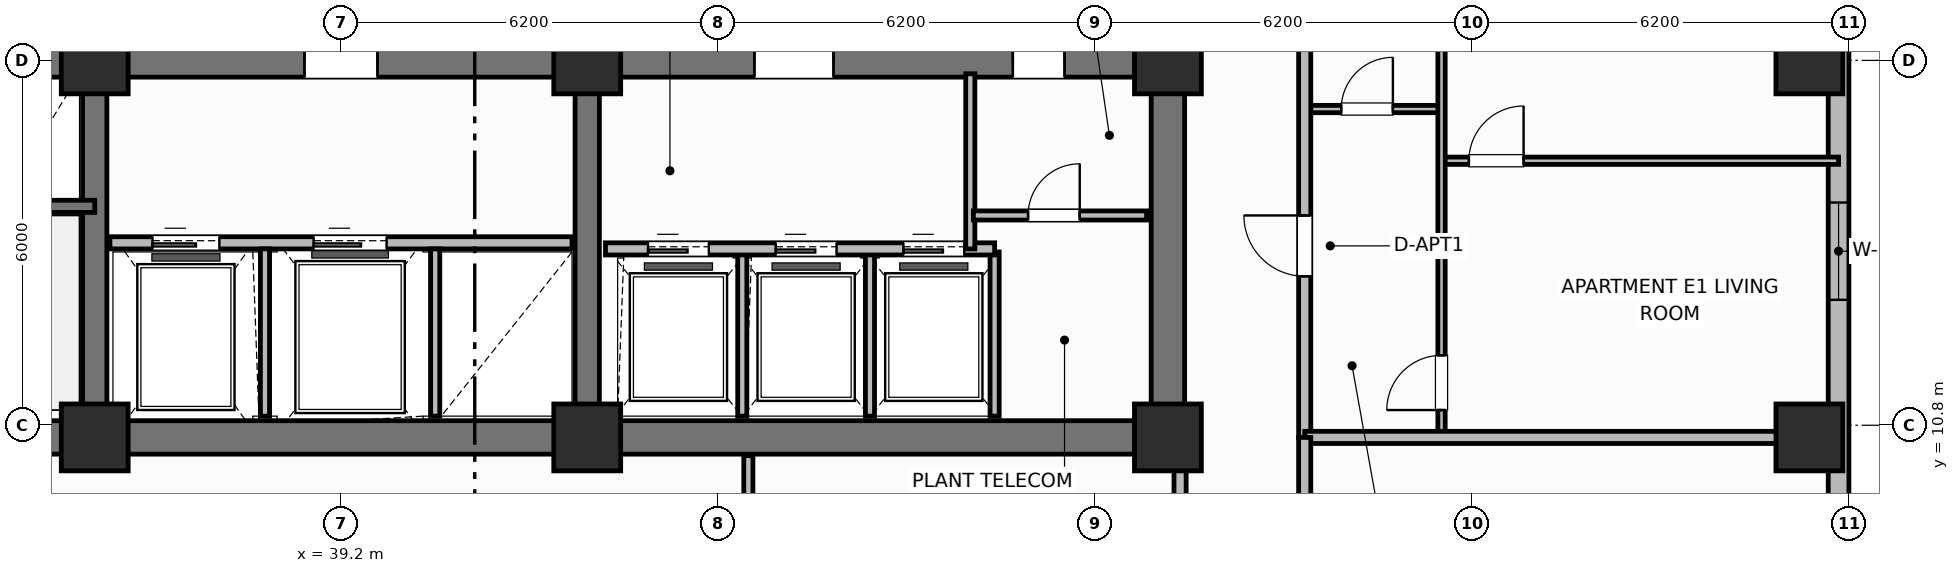
"""IFC4 building model, lengths in metres.
Left out: names, types, materials, properties, quantities, classifications, styles, units other than length and angle.
Written with IfcOpenShell. Run it as: python <this file> out.ifc"""

import sys

from ifc_helpers import new_model, si_unit, direction, frame, frame_2d, origin, origin_2d, place, context, subcontext, project, spatial, rectangle, extrude, element, fill, save


model = new_model("IFC4")
c1 = context("Model", 3, precision=1e-05, world=origin(), true_north=direction((0.0, 1.0)))
c2 = subcontext(c1, "Body", "Model", "MODEL_VIEW")
j1 = project(units=[si_unit("LENGTHUNIT", "METRE"), si_unit("PLANEANGLEUNIT", "RADIAN")], contexts=[c1])
p1 = place(None, origin())
s1 = spatial("IfcSite", under=j1, at=p1, CompositionType="ELEMENT")
p2 = place(p1, origin())
s2 = spatial("IfcBuilding", under=s1, at=p2, CompositionType="ELEMENT")
p3 = place(p2, frame((0.0, 0.0, 84.1)))
s3 = spatial("IfcBuildingStorey", under=s2, at=p3, CompositionType="ELEMENT", Elevation=84.1)
p4 = place(p3, frame((52.8, 10.6, 0.0), z_axis=(0.0, 0.0, 1.0), x_axis=(-1.0, 0.0, 0.0)))
e1 = element("IfcWall", 1, at=p4, inside=s3, PredefinedType="SHEAR", context=c2, shape_type="SweptSolid", body=[
    extrude(rectangle(XDim=27.2, YDim=0.55, at=frame_2d((13.6, 0.0))), origin(), (0.0, 0.0, 1.0), 4.2),
])
p5 = place(p3, frame((52.8, 10.875, 0.0), z_axis=(0.0, 0.0, 1.0), x_axis=(0.0, 1.0, 0.0)))
e2 = element("IfcWall", 2, at=p5, inside=s3, PredefinedType="SHEAR", context=c2, shape_type="SweptSolid", body=[
    extrude(rectangle(XDim=5.65, YDim=0.55, at=frame_2d((2.825, 0.0))), origin(), (0.0, 0.0, 1.0), 4.2),
])
p6 = place(p3, frame((25.6, 16.8, 0.0), z_axis=(0.0, 0.0, 1.0), x_axis=(1.0, 0.0, 0.0)))
e3 = element("IfcWall", 3, at=p6, inside=s3, PredefinedType="SHEAR", context=c2, shape_type="SweptSolid", body=[
    extrude(rectangle(XDim=27.2, YDim=0.55, at=frame_2d((13.6, 0.0))), origin(), (0.0, 0.0, 1.0), 4.2),
])
p7 = place(p6, frame((1.8, 0.0, 0.0)))
e4 = element("IfcOpeningElement", 4, at=p7, cuts=e3, PredefinedType="OPENING", context=c2, shape_type="SweptSolid", body=[
    extrude(rectangle(XDim=1.1, YDim=2.15, at=frame_2d((0.55, 1.075))), frame((0.0, 0.285, 0.0), z_axis=(0.0, -1.0, 0.0), x_axis=(1.0, 0.0, 0.0)), (0.0, 0.0, 1.0), 0.57),
])
p8 = place(p6, frame((5.6, 0.0, 0.0)))
e5 = element("IfcOpeningElement", 5, at=p8, cuts=e3, PredefinedType="OPENING", context=c2, shape_type="SweptSolid", body=[
    extrude(rectangle(XDim=0.85, YDim=2.1, at=frame_2d((0.425, 1.05))), frame((0.0, 0.285, 0.0), z_axis=(0.0, -1.0, 0.0), x_axis=(1.0, 0.0, 0.0)), (0.0, 0.0, 1.0), 0.57),
])
p9 = place(p6, frame((13.0, 0.0, 0.0)))
e6 = element("IfcOpeningElement", 6, at=p9, cuts=e3, PredefinedType="OPENING", context=c2, shape_type="SweptSolid", body=[
    extrude(rectangle(XDim=1.2, YDim=2.15, at=frame_2d((0.6, 1.075))), frame((0.0, 0.285, 0.0), z_axis=(0.0, -1.0, 0.0), x_axis=(1.0, 0.0, 0.0)), (0.0, 0.0, 1.0), 0.57),
])
p10 = place(p6, frame((20.4, 0.0, 0.0)))
e7 = element("IfcOpeningElement", 7, at=p10, cuts=e3, PredefinedType="OPENING", context=c2, shape_type="SweptSolid", body=[
    extrude(rectangle(XDim=1.3, YDim=2.2, at=frame_2d((0.65, 1.1))), frame((0.0, 0.285, 0.0), z_axis=(0.0, -1.0, 0.0), x_axis=(1.0, 0.0, 0.0)), (0.0, 0.0, 1.0), 0.57),
])
p11 = place(p6, frame((24.65, 0.0, 0.0)))
e8 = element("IfcOpeningElement", 8, at=p11, cuts=e3, PredefinedType="OPENING", context=c2, shape_type="SweptSolid", body=[
    extrude(rectangle(XDim=0.85, YDim=2.1, at=frame_2d((0.425, 1.05))), frame((0.0, 0.285, 0.0), z_axis=(0.0, -1.0, 0.0), x_axis=(1.0, 0.0, 0.0)), (0.0, 0.0, 1.0), 0.57),
])
for number, where, z_axis, x_axis in (
    (9, (35.15, 10.875, 0.0), (0.0, 0.0, 1.0), (0.0, 1.0, 0.0)),
    (10, (43.25, 10.875, 0.0), (0.0, 0.0, 1.0), (0.0, 1.0, 0.0)),
):
    element("IfcWall", number, at=place(p3, frame(where, z_axis=z_axis, x_axis=x_axis)), inside=s3, PredefinedType="SHEAR", context=c2, shape_type="SweptSolid", body=[
        extrude(rectangle(XDim=5.65, YDim=0.4, at=frame_2d((2.825, 0.0))), origin(), (0.0, 0.0, 1.0), 4.2),
    ])
for number, where, z_axis, x_axis in (
    (11, (35.15, 10.6, 0.0), (0.0, 0.0, 1.0), (1.0, 0.0, 0.0)),
    (12, (35.15, 16.8, 0.0), (0.0, 0.0, 1.0), (1.0, 0.0, 0.0)),
    (13, (43.25, 10.6, 0.0), (0.0, 0.0, 1.0), (1.0, 0.0, 0.0)),
    (14, (43.25, 16.8, 0.0), (0.0, 0.0, 1.0), (1.0, 0.0, 0.0)),
    (15, (52.8, 10.6, 0.0), (0.0, 0.0, 1.0), (1.0, 0.0, 0.0)),
    (16, (52.8, 16.8, 0.0), (0.0, 0.0, 1.0), (1.0, 0.0, 0.0)),
    (17, (63.35, 10.6, 0.0), (0.0, 0.0, 1.0), (1.0, 0.0, 0.0)),
    (18, (63.35, 16.8, 0.0), (0.0, 0.0, 1.0), (1.0, 0.0, 0.0)),
):
    element("IfcColumn", number, at=place(p3, frame(where, z_axis=z_axis, x_axis=x_axis)), inside=s3, PredefinedType="COLUMN", context=c2, shape_type="SweptSolid", body=[
        extrude(rectangle(XDim=1.1, YDim=1.1, at=origin_2d()), origin(), (0.0, 0.0, 1.0), 4.2),
    ])
p12 = place(p3, frame((63.83, 9.0, 0.0), z_axis=(0.0, 0.0, 1.0), x_axis=(0.0, 1.0, 0.0)))
e19 = element("IfcWall", 19, at=p12, inside=s3, PredefinedType="SOLIDWALL", context=c2, shape_type="SweptSolid", body=[
    extrude(rectangle(XDim=14.8, YDim=0.34, at=frame_2d((7.4, 0.0))), origin(), (0.0, 0.0, 1.0), 3.2),
])
p13 = place(p12, frame((3.863, 0.0, 0.85)))
e20 = element("IfcOpeningElement", 20, at=p13, cuts=e19, PredefinedType="OPENING", context=c2, shape_type="SweptSolid", body=[
    extrude(rectangle(XDim=1.6, YDim=1.9, at=frame_2d((0.8, 0.95))), frame((0.0, 0.18, 0.0), z_axis=(0.0, -1.0, 0.0), x_axis=(1.0, 0.0, 0.0)), (0.0, 0.0, 1.0), 0.36),
])
p14 = place(p12, frame((8.44, 0.0, 0.85)))
e21 = element("IfcOpeningElement", 21, at=p14, cuts=e19, PredefinedType="OPENING", context=c2, shape_type="SweptSolid", body=[
    extrude(rectangle(XDim=1.4, YDim=1.85, at=frame_2d((0.7, 0.925))), frame((0.0, 0.18, 0.0), z_axis=(0.0, -1.0, 0.0), x_axis=(1.0, 0.0, 0.0)), (0.0, 0.0, 1.0), 0.36),
])
p15 = place(p12, frame((11.663, 0.0, 0.85)))
e22 = element("IfcOpeningElement", 22, at=p15, cuts=e19, PredefinedType="OPENING", context=c2, shape_type="SweptSolid", body=[
    extrude(rectangle(XDim=1.6, YDim=1.9, at=frame_2d((0.8, 0.95))), frame((0.0, 0.18, 0.0), z_axis=(0.0, -1.0, 0.0), x_axis=(1.0, 0.0, 0.0)), (0.0, 0.0, 1.0), 0.36),
])
p16 = place(p3, frame((25.6, 14.4, 0.0), z_axis=(0.0, 0.0, 1.0), x_axis=(1.0, 0.0, 0.0)))
e23 = element("IfcWall", 23, at=p16, inside=s3, PredefinedType="SHEAR", context=c2, shape_type="SweptSolid", body=[
    extrude(rectangle(XDim=9.55, YDim=0.2, at=frame_2d((4.775, 0.0))), origin(), (0.0, 0.0, 1.0), 4.2),
])
p17 = place(p16, frame((1.05, 0.0, 0.0)))
e24 = element("IfcOpeningElement", 24, at=p17, cuts=e23, PredefinedType="OPENING", context=c2, shape_type="SweptSolid", body=[
    extrude(rectangle(XDim=1.1, YDim=2.15, at=frame_2d((0.55, 1.075))), frame((0.0, 0.11, 0.0), z_axis=(0.0, -1.0, 0.0), x_axis=(1.0, 0.0, 0.0)), (0.0, 0.0, 1.0), 0.22),
])
p18 = place(p3, frame((35.4, 13.8, 0.0), z_axis=(0.0, 0.0, 1.0), x_axis=(1.0, 0.0, 0.0)))
e25 = element("IfcWall", 25, at=p18, inside=s3, PredefinedType="PARTITIONING", context=c2, shape_type="SweptSolid", body=[
    extrude(rectangle(XDim=7.6, YDim=0.2, at=frame_2d((3.8, 0.0))), origin(), (0.0, 0.0, 1.0), 2.8),
])
p19 = place(p18, frame((0.7, 0.0, 0.0)))
e26 = element("IfcOpeningElement", 26, at=p19, cuts=e25, PredefinedType="OPENING", context=c2, shape_type="SweptSolid", body=[
    extrude(rectangle(XDim=1.1, YDim=2.15, at=frame_2d((0.55, 1.075))), frame((0.0, 0.11, 0.0), z_axis=(0.0, -1.0, 0.0), x_axis=(1.0, 0.0, 0.0)), (0.0, 0.0, 1.0), 0.22),
])
p20 = place(p18, frame((3.35, 0.0, 0.0)))
e27 = element("IfcOpeningElement", 27, at=p20, cuts=e25, PredefinedType="OPENING", context=c2, shape_type="SweptSolid", body=[
    extrude(rectangle(XDim=1.2, YDim=2.15, at=frame_2d((0.6, 1.075))), frame((0.0, 0.11, 0.0), z_axis=(0.0, -1.0, 0.0), x_axis=(1.0, 0.0, 0.0)), (0.0, 0.0, 1.0), 0.22),
])
for number, where, z_axis, x_axis in (
    (28, (37.95, 10.95, 0.0), (0.0, 0.0, 1.0), (0.0, 1.0, 0.0)),
    (29, (40.75, 10.95, 0.0), (0.0, 0.0, 1.0), (0.0, 1.0, 0.0)),
):
    element("IfcWall", number, at=place(p3, frame(where, z_axis=z_axis, x_axis=x_axis)), inside=s3, PredefinedType="PARTITIONING", context=c2, shape_type="SweptSolid", body=[
        extrude(rectangle(XDim=2.75, YDim=0.15, at=frame_2d((1.375, 0.0))), origin(), (0.0, 0.0, 1.0), 3.03),
    ])
for number, where, z_axis, x_axis in (
    (30, (45.8, 10.95, 0.0), (0.0, 0.0, 1.0), (0.0, 1.0, 0.0)),
    (31, (47.9, 10.95, 0.0), (0.0, 0.0, 1.0), (0.0, 1.0, 0.0)),
    (32, (49.95, 10.95, 0.0), (0.0, 0.0, 1.0), (0.0, 1.0, 0.0)),
):
    element("IfcWall", number, at=place(p3, frame(where, z_axis=z_axis, x_axis=x_axis)), inside=s3, PredefinedType="PARTITIONING", context=c2, shape_type="SweptSolid", body=[
        extrude(rectangle(XDim=2.7, YDim=0.15, at=frame_2d((1.35, 0.0))), origin(), (0.0, 0.0, 1.0), 3.03),
    ])
p21 = place(p3, frame((43.55, 13.7, 0.0), z_axis=(0.0, 0.0, 1.0), x_axis=(1.0, 0.0, 0.0)))
e33 = element("IfcWall", 33, at=p21, inside=s3, PredefinedType="PARTITIONING", context=c2, shape_type="SweptSolid", body=[
    extrude(rectangle(XDim=6.4, YDim=0.2, at=frame_2d((3.2, 0.0))), origin(), (0.0, 0.0, 1.0), 3.03),
])
p22 = place(p21, frame((0.7, 0.0, 0.0)))
e34 = element("IfcOpeningElement", 34, at=p22, cuts=e33, PredefinedType="OPENING", context=c2, shape_type="SweptSolid", body=[
    extrude(rectangle(XDim=1.0, YDim=2.15, at=frame_2d((0.5, 1.075))), frame((0.0, 0.11, 0.0), z_axis=(0.0, -1.0, 0.0), x_axis=(1.0, 0.0, 0.0)), (0.0, 0.0, 1.0), 0.22),
])
p23 = place(p21, frame((2.8, 0.0, 0.0)))
e35 = element("IfcOpeningElement", 35, at=p23, cuts=e33, PredefinedType="OPENING", context=c2, shape_type="SweptSolid", body=[
    extrude(rectangle(XDim=1.0, YDim=2.15, at=frame_2d((0.5, 1.075))), frame((0.0, 0.11, 0.0), z_axis=(0.0, -1.0, 0.0), x_axis=(1.0, 0.0, 0.0)), (0.0, 0.0, 1.0), 0.22),
])
p24 = place(p21, frame((4.9, 0.0, 0.0)))
e36 = element("IfcOpeningElement", 36, at=p24, cuts=e33, PredefinedType="OPENING", context=c2, shape_type="SweptSolid", body=[
    extrude(rectangle(XDim=1.0, YDim=2.15, at=frame_2d((0.5, 1.075))), frame((0.0, 0.11, 0.0), z_axis=(0.0, -1.0, 0.0), x_axis=(1.0, 0.0, 0.0)), (0.0, 0.0, 1.0), 0.22),
])
p25 = place(p3, frame((49.55, 13.7, 0.0), z_axis=(0.0, 0.0, 1.0), x_axis=(0.0, 1.0, 0.0)))
e37 = element("IfcWall", 37, at=p25, inside=s3, PredefinedType="PARTITIONING", context=c2, shape_type="SweptSolid", body=[
    extrude(rectangle(XDim=2.88, YDim=0.15, at=frame_2d((1.44, 0.0))), origin(), (0.0, 0.0, 1.0), 3.03),
])
p26 = place(p3, frame((49.6, 14.25, 0.0), z_axis=(0.0, 0.0, 1.0), x_axis=(1.0, 0.0, 0.0)))
e38 = element("IfcWall", 38, at=p26, inside=s3, PredefinedType="PARTITIONING", context=c2, shape_type="SweptSolid", body=[
    extrude(rectangle(XDim=2.85, YDim=0.15, at=frame_2d((1.425, 0.0))), origin(), (0.0, 0.0, 1.0), 3.03),
])
p27 = place(p26, frame((0.9, 0.0, 0.0)))
e39 = element("IfcOpeningElement", 39, at=p27, cuts=e38, PredefinedType="OPENING", context=c2, shape_type="SweptSolid", body=[
    extrude(rectangle(XDim=0.85, YDim=2.1, at=frame_2d((0.425, 1.05))), frame((0.0, 0.085, 0.0), z_axis=(0.0, -1.0, 0.0), x_axis=(1.0, 0.0, 0.0)), (0.0, 0.0, 1.0), 0.17),
])
p28 = place(p3, frame((55.05, 16.0, 0.0), z_axis=(0.0, 0.0, 1.0), x_axis=(1.0, 0.0, 0.0)))
e40 = element("IfcWall", 40, at=p28, inside=s3, PredefinedType="PARTITIONING", context=c2, shape_type="SweptSolid", body=[
    extrude(rectangle(XDim=2.25, YDim=0.12, at=frame_2d((1.125, 0.0))), origin(), (0.0, 0.0, 1.0), 3.03),
])
p29 = place(p28, frame((0.6, 0.0, 0.0)))
e41 = element("IfcOpeningElement", 41, at=p29, cuts=e40, PredefinedType="OPENING", context=c2, shape_type="SweptSolid", body=[
    extrude(rectangle(XDim=0.85, YDim=2.1, at=frame_2d((0.425, 1.05))), frame((0.0, 0.07, 0.0), z_axis=(0.0, -1.0, 0.0), x_axis=(1.0, 0.0, 0.0)), (0.0, 0.0, 1.0), 0.14),
])
p30 = place(p3, frame((57.3, 15.15, 0.0), z_axis=(0.0, 0.0, 1.0), x_axis=(1.0, 0.0, 0.0)))
e42 = element("IfcWall", 42, at=p30, inside=s3, PredefinedType="PARTITIONING", context=c2, shape_type="SweptSolid", body=[
    extrude(rectangle(XDim=6.53, YDim=0.12, at=frame_2d((3.265, 0.0))), origin(), (0.0, 0.0, 1.0), 3.03),
])
p31 = place(p30, frame((0.45, 0.0, 0.0)))
e43 = element("IfcOpeningElement", 43, at=p31, cuts=e42, PredefinedType="OPENING", context=c2, shape_type="SweptSolid", body=[
    extrude(rectangle(XDim=0.9, YDim=2.1, at=frame_2d((0.45, 1.05))), frame((0.0, 0.07, 0.0), z_axis=(0.0, -1.0, 0.0), x_axis=(1.0, 0.0, 0.0)), (0.0, 0.0, 1.0), 0.14),
])
p32 = place(p3, frame((57.3, 10.64, 0.0), z_axis=(0.0, 0.0, 1.0), x_axis=(0.0, 1.0, 0.0)))
e44 = element("IfcWall", 44, at=p32, inside=s3, PredefinedType="PARTITIONING", context=c2, shape_type="SweptSolid", body=[
    extrude(rectangle(XDim=19.12, YDim=0.12, at=frame_2d((9.56, 0.0))), origin(), (0.0, 0.0, 1.0), 3.03),
])
p33 = place(p32, frame((0.41, 0.0, 0.0)))
e45 = element("IfcOpeningElement", 45, at=p33, cuts=e44, PredefinedType="OPENING", context=c2, shape_type="SweptSolid", body=[
    extrude(rectangle(XDim=0.9, YDim=2.1, at=frame_2d((0.45, 1.05))), frame((0.0, 0.07, 0.0), z_axis=(0.0, -1.0, 0.0), x_axis=(1.0, 0.0, 0.0)), (0.0, 0.0, 1.0), 0.14),
])
p34 = place(p32, frame((12.105, 0.0, 0.0)))
e46 = element("IfcOpeningElement", 46, at=p34, cuts=e44, PredefinedType="OPENING", context=c2, shape_type="SweptSolid", body=[
    extrude(rectangle(XDim=0.82, YDim=2.08, at=frame_2d((0.41, 1.04))), frame((0.0, 0.07, 0.0), z_axis=(0.0, -1.0, 0.0), x_axis=(1.0, 0.0, 0.0)), (0.0, 0.0, 1.0), 0.14),
])
p35 = place(p3, frame((55.05, 10.6, 0.0), z_axis=(0.0, 0.0, 1.0), x_axis=(0.0, 1.0, 0.0)))
e47 = element("IfcWall", 47, at=p35, inside=s3, PredefinedType="PARTITIONING", context=c2, shape_type="SweptSolid", body=[
    extrude(rectangle(XDim=35.2, YDim=0.2, at=frame_2d((17.6, 0.0))), origin(), (0.0, 0.0, 1.0), 3.03),
])
p36 = place(p35, frame((2.65, 0.0, 0.0)))
e48 = element("IfcOpeningElement", 48, at=p36, cuts=e47, PredefinedType="OPENING", context=c2, shape_type="SweptSolid", body=[
    extrude(rectangle(XDim=1.0, YDim=2.15, at=frame_2d((0.5, 1.075))), frame((0.0, 0.11, 0.0), z_axis=(0.0, -1.0, 0.0), x_axis=(1.0, 0.0, 0.0)), (0.0, 0.0, 1.0), 0.22),
])
p37 = place(p35, frame((22.75, 0.0, 0.0)))
e49 = element("IfcOpeningElement", 49, at=p37, cuts=e47, PredefinedType="OPENING", context=c2, shape_type="SweptSolid", body=[
    extrude(rectangle(XDim=1.0, YDim=2.15, at=frame_2d((0.5, 1.075))), frame((0.0, 0.11, 0.0), z_axis=(0.0, -1.0, 0.0), x_axis=(1.0, 0.0, 0.0)), (0.0, 0.0, 1.0), 0.22),
])
p38 = place(p3, frame((55.05, 10.6, 0.0), z_axis=(0.0, 0.0, 1.0), x_axis=(1.0, 0.0, 0.0)))
e50 = element("IfcWall", 50, at=p38, inside=s3, PredefinedType="PARTITIONING", context=c2, shape_type="SweptSolid", body=[
    extrude(rectangle(XDim=8.36, YDim=0.2, at=frame_2d((4.18, 0.0))), origin(), (0.0, 0.0, 1.0), 3.03),
])
p39 = place(p3, frame((55.05, 4.97, 0.0), z_axis=(0.0, 0.0, 1.0), x_axis=(0.0, 1.0, 0.0)))
e51 = element("IfcWall", 51, at=p39, inside=s3, PredefinedType="PARTITIONING", context=c2, shape_type="SweptSolid", body=[
    extrude(rectangle(XDim=5.63, YDim=0.2, at=frame_2d((2.815, 0.0))), origin(), (0.0, 0.0, 1.0), 3.03),
])
p40 = place(p3, frame((45.9, 4.97, 0.0), z_axis=(0.0, 0.0, 1.0), x_axis=(0.0, 1.0, 0.0)))
e52 = element("IfcWall", 52, at=p40, inside=s3, PredefinedType="PARTITIONING", context=c2, shape_type="SweptSolid", body=[
    extrude(rectangle(XDim=5.33, YDim=0.15, at=frame_2d((2.665, 0.0))), origin(), (0.0, 0.0, 1.0), 3.03),
])
p41 = place(p3, frame((53.0, 5.52, 0.0), z_axis=(0.0, 0.0, 1.0), x_axis=(0.0, 1.0, 0.0)))
e53 = element("IfcWall", 53, at=p41, inside=s3, PredefinedType="PARTITIONING", context=c2, shape_type="SweptSolid", body=[
    extrude(rectangle(XDim=4.78, YDim=0.2, at=frame_2d((2.39, 0.0))), origin(), (0.0, 0.0, 1.0), 3.03),
])
p42 = place(p41, frame((1.3, 0.0, 0.0)))
e54 = element("IfcOpeningElement", 54, at=p42, cuts=e53, PredefinedType="OPENING", context=c2, shape_type="SweptSolid", body=[
    extrude(rectangle(XDim=0.9, YDim=2.1, at=frame_2d((0.45, 1.05))), frame((0.0, 0.11, 0.0), z_axis=(0.0, -1.0, 0.0), x_axis=(1.0, 0.0, 0.0)), (0.0, 0.0, 1.0), 0.22),
])
p43 = place(p13, origin())
e55 = element("IfcWindow", 55, at=p43, inside=s3, PartitioningType="SINGLE_PANEL", PredefinedType="WINDOW", context=c2, shape_type="SweptSolid", body=[
    extrude(rectangle(XDim=1.6, YDim=1.9, at=frame_2d((0.8, 0.95))), frame((0.0, 0.03, 0.0), z_axis=(0.0, -1.0, 0.0), x_axis=(1.0, 0.0, 0.0)), (0.0, 0.0, 1.0), 0.06),
])
fill(e20, e55)
p44 = place(p19, origin())
e56 = element("IfcDoor", 56, at=p44, inside=s3, OperationType="SLIDING_TO_LEFT", PredefinedType="DOOR", context=c2, shape_type="SweptSolid", body=[
    extrude(rectangle(XDim=1.1, YDim=2.15, at=frame_2d((0.55, 1.075))), frame((0.0, 0.025, 0.0), z_axis=(0.0, -1.0, 0.0), x_axis=(1.0, 0.0, 0.0)), (0.0, 0.0, 1.0), 0.05),
])
fill(e26, e56)
p45 = place(p20, origin())
e57 = element("IfcDoor", 57, at=p45, inside=s3, OperationType="SLIDING_TO_LEFT", PredefinedType="DOOR", context=c2, shape_type="SweptSolid", body=[
    extrude(rectangle(XDim=1.2, YDim=2.15, at=frame_2d((0.6, 1.075))), frame((0.0, 0.025, 0.0), z_axis=(0.0, -1.0, 0.0), x_axis=(1.0, 0.0, 0.0)), (0.0, 0.0, 1.0), 0.05),
])
fill(e27, e57)
p46 = place(p22, origin())
e58 = element("IfcDoor", 58, at=p46, inside=s3, OperationType="SLIDING_TO_LEFT", PredefinedType="DOOR", context=c2, shape_type="SweptSolid", body=[
    extrude(rectangle(XDim=1.0, YDim=2.15, at=frame_2d((0.5, 1.075))), frame((0.0, 0.025, 0.0), z_axis=(0.0, -1.0, 0.0), x_axis=(1.0, 0.0, 0.0)), (0.0, 0.0, 1.0), 0.05),
])
fill(e34, e58)
p47 = place(p23, origin())
e59 = element("IfcDoor", 59, at=p47, inside=s3, OperationType="SLIDING_TO_LEFT", PredefinedType="DOOR", context=c2, shape_type="SweptSolid", body=[
    extrude(rectangle(XDim=1.0, YDim=2.15, at=frame_2d((0.5, 1.075))), frame((0.0, 0.025, 0.0), z_axis=(0.0, -1.0, 0.0), x_axis=(1.0, 0.0, 0.0)), (0.0, 0.0, 1.0), 0.05),
])
fill(e35, e59)
p48 = place(p24, origin())
e60 = element("IfcDoor", 60, at=p48, inside=s3, OperationType="SLIDING_TO_LEFT", PredefinedType="DOOR", context=c2, shape_type="SweptSolid", body=[
    extrude(rectangle(XDim=1.0, YDim=2.15, at=frame_2d((0.5, 1.075))), frame((0.0, 0.025, 0.0), z_axis=(0.0, -1.0, 0.0), x_axis=(1.0, 0.0, 0.0)), (0.0, 0.0, 1.0), 0.05),
])
fill(e36, e60)
p49 = place(p27, origin())
e61 = element("IfcDoor", 61, at=p49, inside=s3, OperationType="SINGLE_SWING_RIGHT", PredefinedType="DOOR", context=c2, shape_type="SweptSolid", body=[
    extrude(rectangle(XDim=0.85, YDim=2.1, at=frame_2d((0.425, 1.05))), frame((0.0, 0.025, 0.0), z_axis=(0.0, -1.0, 0.0), x_axis=(1.0, 0.0, 0.0)), (0.0, 0.0, 1.0), 0.05),
])
fill(e39, e61)
p50 = place(p29, origin())
e62 = element("IfcDoor", 62, at=p50, inside=s3, OperationType="SINGLE_SWING_RIGHT", PredefinedType="DOOR", context=c2, shape_type="SweptSolid", body=[
    extrude(rectangle(XDim=0.85, YDim=2.1, at=frame_2d((0.425, 1.05))), frame((0.0, 0.025, 0.0), z_axis=(0.0, -1.0, 0.0), x_axis=(1.0, 0.0, 0.0)), (0.0, 0.0, 1.0), 0.05),
])
fill(e41, e62)
p51 = place(p31, origin())
e63 = element("IfcDoor", 63, at=p51, inside=s3, OperationType="SINGLE_SWING_RIGHT", PredefinedType="DOOR", context=c2, shape_type="SweptSolid", body=[
    extrude(rectangle(XDim=0.9, YDim=2.1, at=frame_2d((0.45, 1.05))), frame((0.0, 0.025, 0.0), z_axis=(0.0, -1.0, 0.0), x_axis=(1.0, 0.0, 0.0)), (0.0, 0.0, 1.0), 0.05),
])
fill(e43, e63)
p52 = place(p33, origin())
e64 = element("IfcDoor", 64, at=p52, inside=s3, OperationType="SINGLE_SWING_LEFT", PredefinedType="DOOR", context=c2, shape_type="SweptSolid", body=[
    extrude(rectangle(XDim=0.9, YDim=2.1, at=frame_2d((0.45, 1.05))), frame((0.0, 0.025, 0.0), z_axis=(0.0, -1.0, 0.0), x_axis=(1.0, 0.0, 0.0)), (0.0, 0.0, 1.0), 0.05),
])
fill(e45, e64)
p53 = place(p36, origin())
e65 = element("IfcDoor", 65, at=p53, inside=s3, OperationType="SINGLE_SWING_RIGHT", PredefinedType="DOOR", context=c2, shape_type="SweptSolid", body=[
    extrude(rectangle(XDim=1.0, YDim=2.15, at=frame_2d((0.5, 1.075))), frame((0.0, 0.025, 0.0), z_axis=(0.0, -1.0, 0.0), x_axis=(1.0, 0.0, 0.0)), (0.0, 0.0, 1.0), 0.05),
])
fill(e48, e65)
p54 = place(p9, origin())
e66 = element("IfcDoor", 66, at=p54, inside=s3, OperationType="SINGLE_SWING_LEFT", PredefinedType="DOOR", context=c2, shape_type="SweptSolid", body=[
    extrude(rectangle(XDim=1.2, YDim=2.15, at=frame_2d((0.6, 1.075))), frame((0.0, 0.025, 0.0), z_axis=(0.0, -1.0, 0.0), x_axis=(1.0, 0.0, 0.0)), (0.0, 0.0, 1.0), 0.05),
])
fill(e6, e66)
p55 = place(p10, origin())
e67 = element("IfcDoor", 67, at=p55, inside=s3, OperationType="SINGLE_SWING_RIGHT", PredefinedType="DOOR", context=c2, shape_type="SweptSolid", body=[
    extrude(rectangle(XDim=1.3, YDim=2.2, at=frame_2d((0.65, 1.1))), frame((0.0, 0.025, 0.0), z_axis=(0.0, -1.0, 0.0), x_axis=(1.0, 0.0, 0.0)), (0.0, 0.0, 1.0), 0.05),
])
fill(e7, e67)
p56 = place(p11, origin())
e68 = element("IfcDoor", 68, at=p56, inside=s3, OperationType="SINGLE_SWING_LEFT", PredefinedType="DOOR", context=c2, shape_type="SweptSolid", body=[
    extrude(rectangle(XDim=0.85, YDim=2.1, at=frame_2d((0.425, 1.05))), frame((0.0, 0.025, 0.0), z_axis=(0.0, -1.0, 0.0), x_axis=(1.0, 0.0, 0.0)), (0.0, 0.0, 1.0), 0.05),
])
fill(e8, e68)
save(model, sys.argv[1])
